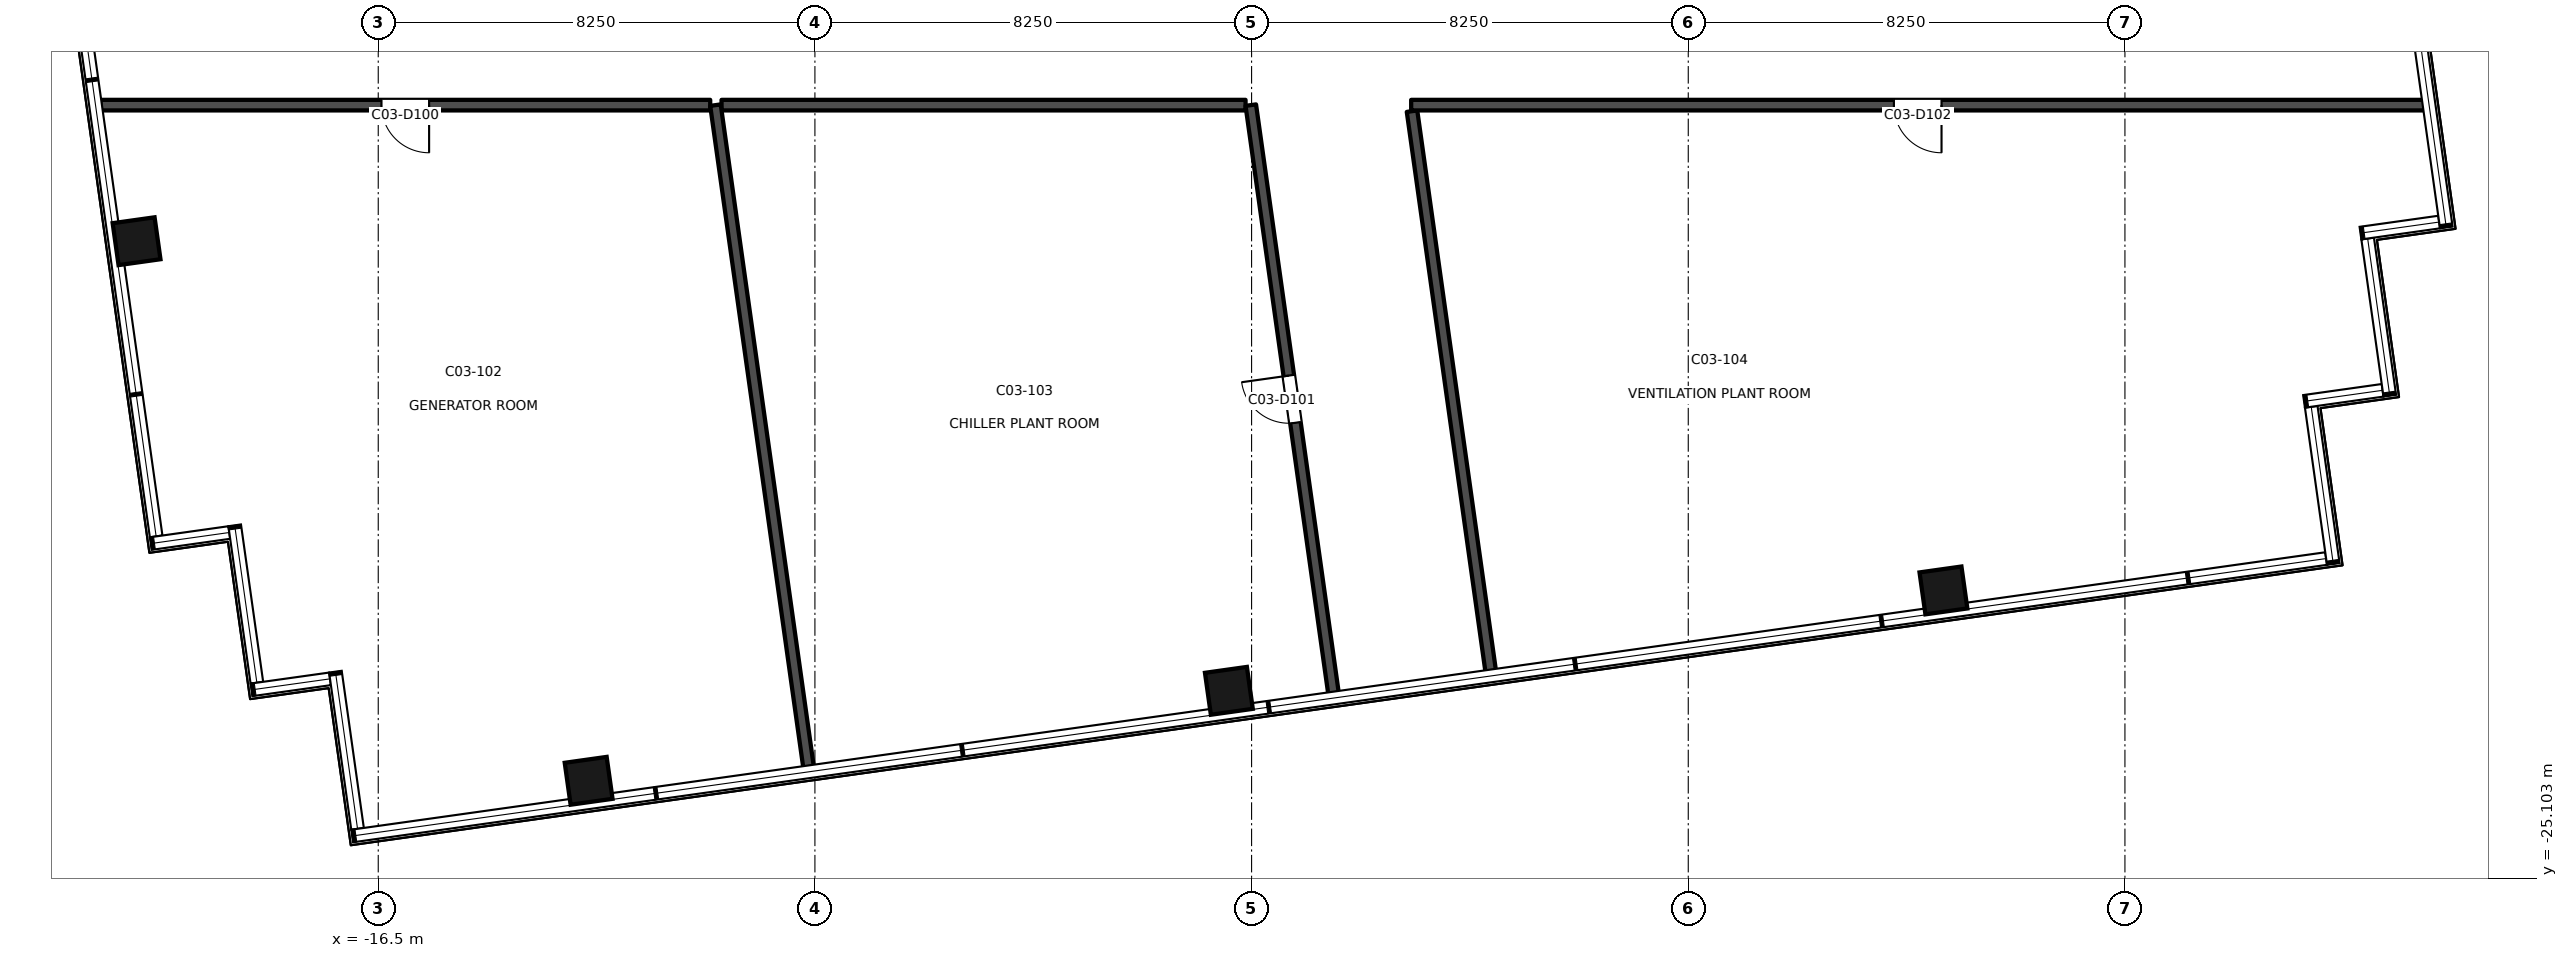
"""IFC4 building model, lengths in metres.
Left out: names, types, materials, properties, quantities, classifications, styles, units other than length and angle.
Written with IfcOpenShell. Run it as: python <this file> out.ifc"""

import sys

from ifc_helpers import new_model, si_unit, direction, frame, frame_2d, origin, origin_2d, place, context, subcontext, project, spatial, rectangle, extrude, element, fill, save


model = new_model("IFC4")
c1 = context("Model", 3, precision=1e-05, world=origin(), true_north=direction((0.0, 1.0)))
c2 = subcontext(c1, "Body", "Model", "MODEL_VIEW")
j1 = project(units=[si_unit("LENGTHUNIT", "METRE"), si_unit("PLANEANGLEUNIT", "RADIAN")], contexts=[c1])
p1 = place(None, origin())
s1 = spatial("IfcSite", under=j1, at=p1, CompositionType="ELEMENT")
p2 = place(p1, origin())
s2 = spatial("IfcBuilding", under=s1, at=p2, CompositionType="ELEMENT")
p3 = place(p2, frame((0.0, 0.0, 300.3)))
s3 = spatial("IfcBuildingStorey", under=s2, at=p3, CompositionType="ELEMENT", Elevation=300.3)
for number, where, z_axis, x_axis in (
    (1, (-12.525, -23.266, -0.2), (0.0, 0.0, 1.0), (0.99, 0.139, 0.0)),
    (2, (-0.429, -21.566, -0.2), (0.0, 0.0, 1.0), (0.99, 0.139, 0.0)),
    (3, (13.071, -19.669, -0.2), (0.0, 0.0, 1.0), (0.99, 0.139, 0.0)),
    (4, (-21.066, -13.071, -0.2), (0.0, 0.0, 1.0), (-0.139, 0.99, 0.0)),
):
    element("IfcColumn", number, at=place(p3, frame(where, z_axis=z_axis, x_axis=x_axis)), inside=s3, PredefinedType="COLUMN", context=c2, shape_type="SweptSolid", body=[
        extrude(rectangle(XDim=0.8, YDim=0.8, at=origin_2d()), origin(), (0.0, 0.0, 1.0), 4.0),
    ])
p4 = place(p3, frame((-10.228, -10.5, 0.0), z_axis=(0.0, 0.0, 1.0), x_axis=(-1.0, 0.0, 0.0)))
e5 = element("IfcWall", 5, at=p4, inside=s3, PredefinedType="PARTITIONING", context=c2, shape_type="SweptSolid", body=[
    extrude(rectangle(XDim=11.522, YDim=0.2, at=frame_2d((5.761, 0.0))), origin(), (0.0, 0.0, 1.0), 3.8),
])
p5 = place(p4, frame((5.311, 0.0, 0.0)))
e6 = element("IfcOpeningElement", 6, at=p5, cuts=e5, PredefinedType="OPENING", context=c2, shape_type="SweptSolid", body=[
    extrude(rectangle(XDim=0.9, YDim=2.1, at=frame_2d((0.45, 1.05))), frame((0.0, 0.111, 0.0), z_axis=(0.0, -1.0, 0.0), x_axis=(1.0, 0.0, 0.0)), (0.0, 0.0, 1.0), 0.221),
])
p6 = place(p3, frame((-0.114, -10.5, 0.0), z_axis=(0.0, 0.0, 1.0), x_axis=(-1.0, 0.0, 0.0)))
e7 = element("IfcWall", 7, at=p6, inside=s3, PredefinedType="PARTITIONING", context=c2, shape_type="SweptSolid", body=[
    extrude(rectangle(XDim=9.9, YDim=0.2, at=frame_2d((4.95, 0.0))), origin(), (0.0, 0.0, 1.0), 3.1),
])
p7 = place(p3, frame((1.547, -21.611, 0.0), z_axis=(0.0, 0.0, 1.0), x_axis=(-0.139212491044, 0.990262532027, 0.0)))
e8 = element("IfcWall", 8, at=p7, inside=s3, PredefinedType="PARTITIONING", context=c2, shape_type="SweptSolid", body=[
    extrude(rectangle(XDim=11.22, YDim=0.2, at=frame_2d((5.61, 0.0))), origin(), (0.0, 0.0, 1.0), 3.2),
])
p8 = place(p7, frame((5.16, 0.0, 0.0)))
e9 = element("IfcOpeningElement", 9, at=p8, cuts=e8, PredefinedType="OPENING", context=c2, shape_type="SweptSolid", body=[
    extrude(rectangle(XDim=0.9, YDim=2.1, at=frame_2d((0.45, 1.05))), frame((0.0, 0.111, 0.0), z_axis=(0.0, -1.0, 0.0), x_axis=(1.0, 0.0, 0.0)), (0.0, 0.0, 1.0), 0.221),
])
p9 = place(p3, frame((3.031, -10.614, 0.0), z_axis=(0.0, 0.0, 1.0), x_axis=(0.139107763668, -0.990277249101, 0.0)))
e10 = element("IfcWall", 10, at=p9, inside=s3, PredefinedType="PARTITIONING", context=c2, shape_type="SweptSolid", body=[
    extrude(rectangle(XDim=10.683, YDim=0.2, at=frame_2d((5.341, 0.0))), origin(), (0.0, 0.0, 1.0), 3.19),
])
p10 = place(p3, frame((22.155, -10.5, 0.0), z_axis=(0.0, 0.0, 1.0), x_axis=(-1.0, 0.0, 0.0)))
e11 = element("IfcWall", 11, at=p10, inside=s3, PredefinedType="PARTITIONING", context=c2, shape_type="SweptSolid", body=[
    extrude(rectangle(XDim=19.14, YDim=0.2, at=frame_2d((9.57, 0.0))), origin(), (0.0, 0.0, 1.0), 3.19),
])
p11 = place(p10, frame((9.12, 0.0, 0.0)))
e12 = element("IfcOpeningElement", 12, at=p11, cuts=e11, PredefinedType="OPENING", context=c2, shape_type="SweptSolid", body=[
    extrude(rectangle(XDim=0.9, YDim=2.1, at=frame_2d((0.45, 1.05))), frame((0.0, 0.111, 0.0), z_axis=(0.0, -1.0, 0.0), x_axis=(1.0, 0.0, 0.0)), (0.0, 0.0, 1.0), 0.221),
])
p12 = place(p3, frame((-10.129, -10.5, 0.0), z_axis=(0.0, 0.0, 1.0), x_axis=(0.139201510054, -0.990264075688, 0.0)))
e13 = element("IfcWall", 13, at=p12, inside=s3, PredefinedType="PARTITIONING", context=c2, shape_type="SweptSolid", body=[
    extrude(rectangle(XDim=12.628, YDim=0.2, at=frame_2d((6.314, 0.0))), origin(), (0.0, 0.0, 1.0), 3.1),
])
p13 = place(p5, origin())
e14 = element("IfcDoor", 14, at=p13, inside=s3, OperationType="SINGLE_SWING_LEFT", PredefinedType="DOOR", context=c2, shape_type="SweptSolid", body=[
    extrude(rectangle(XDim=0.9, YDim=2.1, at=frame_2d((0.45, 1.05))), frame((0.0, 0.025, 0.0), z_axis=(0.0, -1.0, 0.0), x_axis=(1.0, 0.0, 0.0)), (0.0, 0.0, 1.0), 0.05),
])
fill(e6, e14)
p14 = place(p8, origin())
e15 = element("IfcDoor", 15, at=p14, inside=s3, OperationType="SINGLE_SWING_RIGHT", PredefinedType="DOOR", context=c2, shape_type="SweptSolid", body=[
    extrude(rectangle(XDim=0.9, YDim=2.1, at=frame_2d((0.45, 1.05))), frame((0.0, 0.025, 0.0), z_axis=(0.0, -1.0, 0.0), x_axis=(1.0, 0.0, 0.0)), (0.0, 0.0, 1.0), 0.05),
])
fill(e9, e15)
p15 = place(p11, origin())
e16 = element("IfcDoor", 16, at=p15, inside=s3, OperationType="SINGLE_SWING_LEFT", PredefinedType="DOOR", context=c2, shape_type="SweptSolid", body=[
    extrude(rectangle(XDim=0.9, YDim=2.1, at=frame_2d((0.45, 1.05))), frame((0.0, 0.025, 0.0), z_axis=(0.0, -1.0, 0.0), x_axis=(1.0, 0.0, 0.0)), (0.0, 0.0, 1.0), 0.05),
])
fill(e12, e16)
save(model, sys.argv[1])
